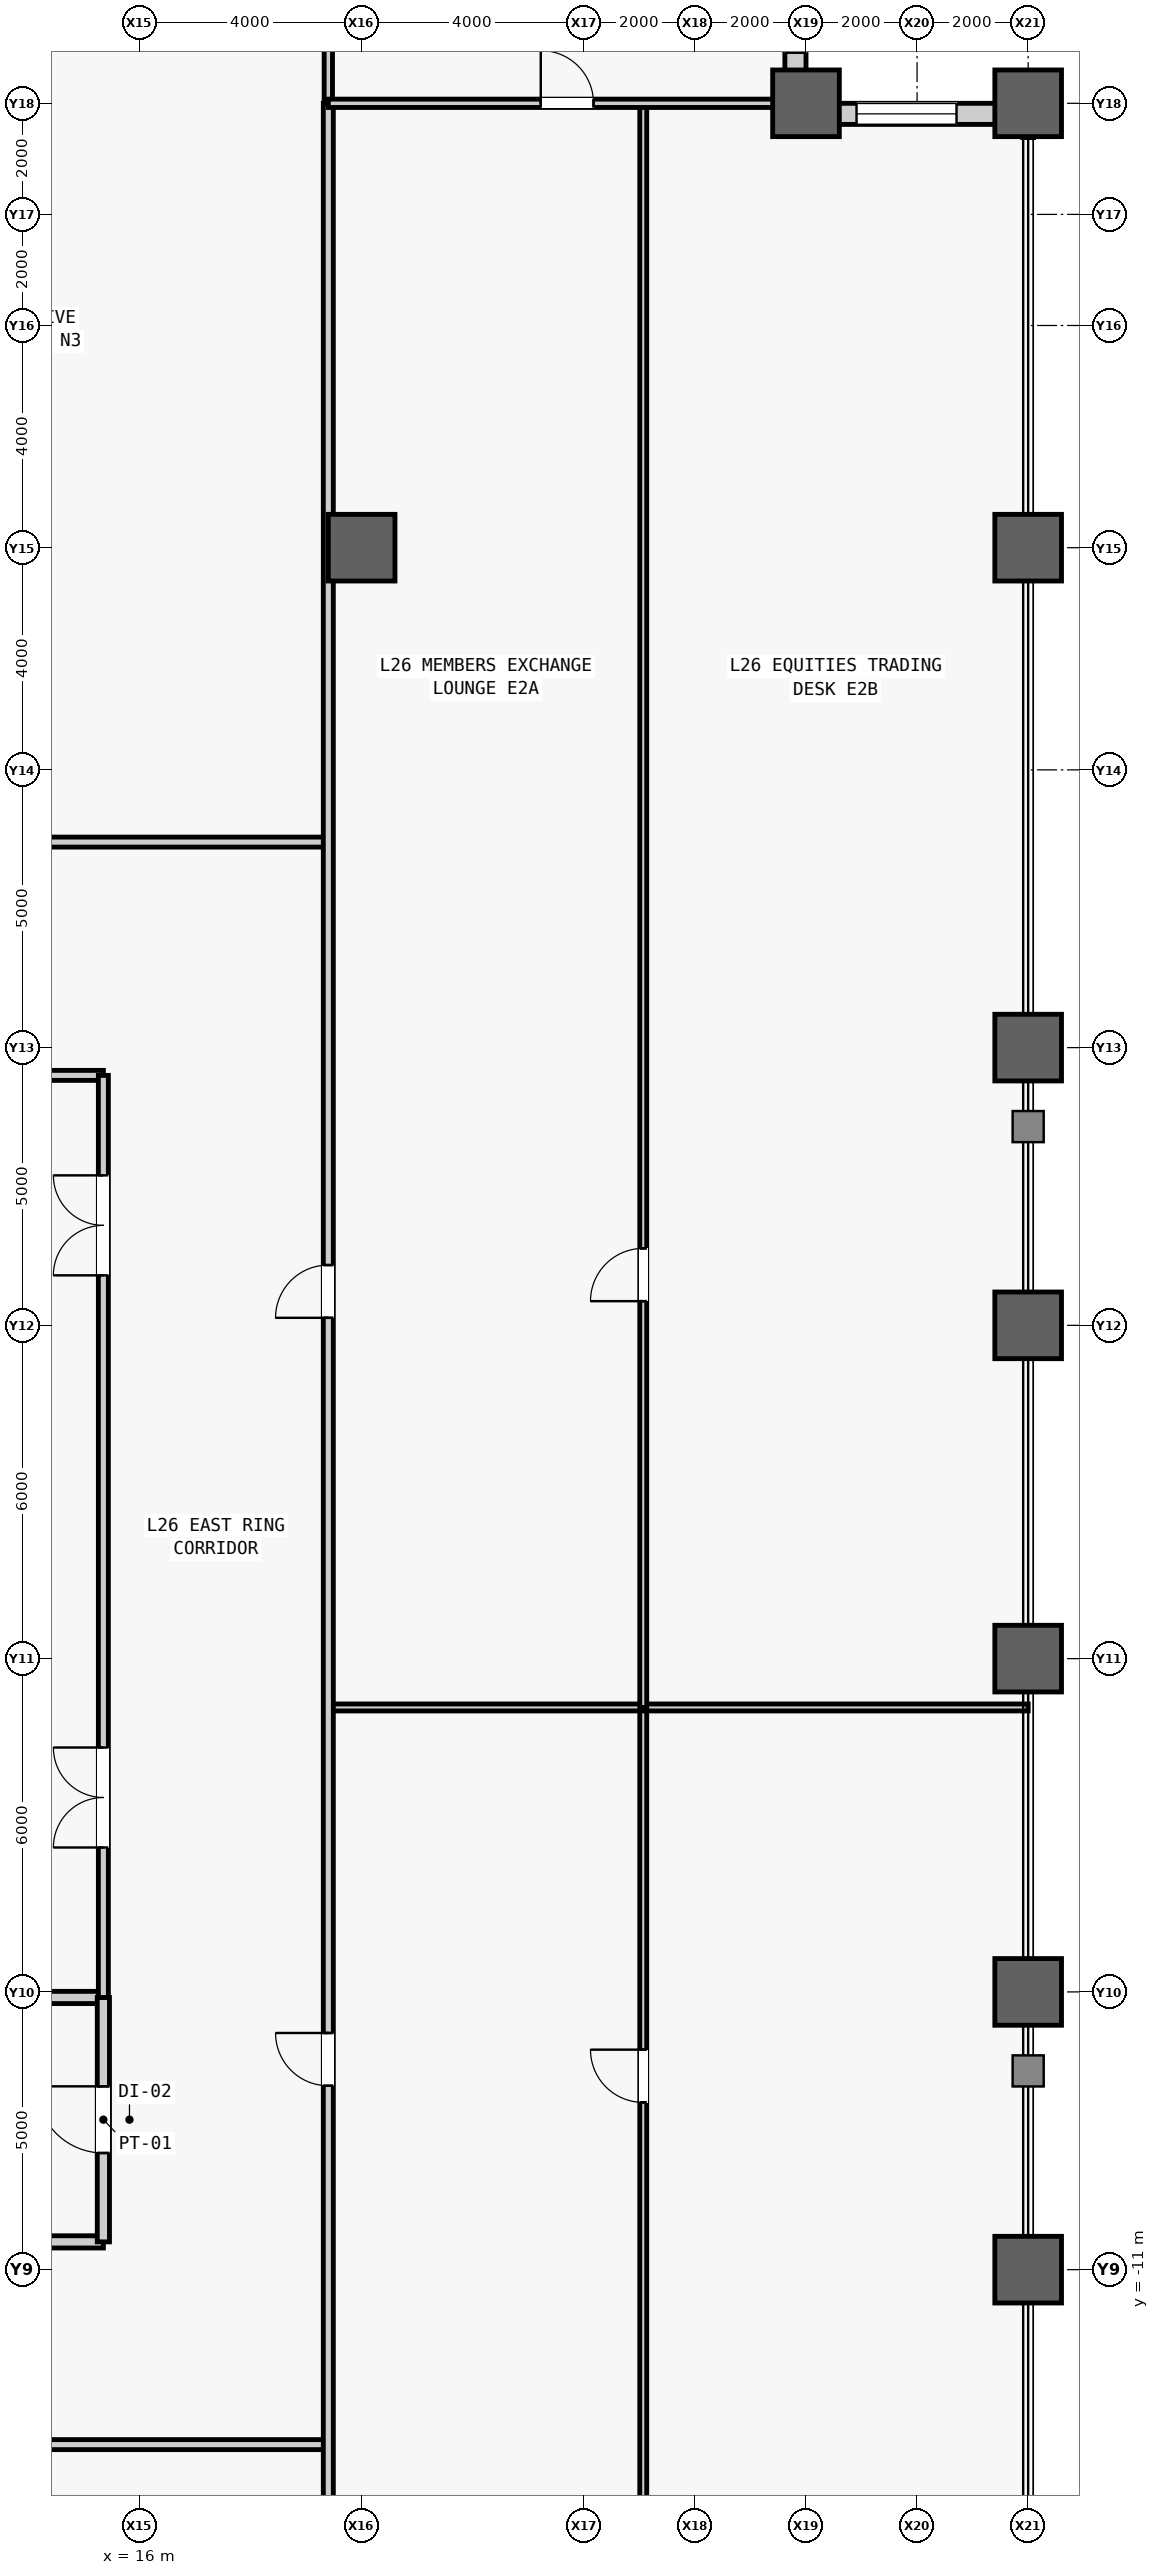
"""IFC4 building model, lengths in metres.
Left out: names, types, materials, properties, quantities, classifications, styles, units other than length and angle.
Written with IfcOpenShell. Run it as: python <this file> out.ifc"""

import sys

from ifc_helpers import new_model, si_unit, direction, frame, frame_2d, origin, origin_2d, place, context, subcontext, project, spatial, rectangle, hollow_rectangle, extrude, source, transform, mapped, element, fill, save


model = new_model("IFC4")
c1 = context("Model", 3, precision=1e-05, world=origin(), true_north=direction((0.0, 1.0)))
c2 = subcontext(c1, "Body", "Model", "MODEL_VIEW")
j1 = project(units=[si_unit("LENGTHUNIT", "METRE"), si_unit("PLANEANGLEUNIT", "RADIAN")], contexts=[c1])
p1 = place(None, origin())
s1 = spatial("IfcSite", under=j1, at=p1, CompositionType="ELEMENT")
p2 = place(p1, origin())
s2 = spatial("IfcBuilding", under=s1, at=p2, CompositionType="ELEMENT")
p3 = place(p2, frame((0.0, 0.0, 116.0)))
s3 = spatial("IfcBuildingStorey", under=s2, at=p3, CompositionType="ELEMENT", Elevation=116.0)
m1 = source(origin(), c2, "Body", "SweptSolid", [
    extrude(hollow_rectangle(XDim=1.2, YDim=1.2, WallThickness=0.07, at=origin_2d()), origin(), (0.0, 0.0, 1.0), 4.1),
])
for number, where, z_axis, x_axis in (
    (1, (20.0, 20.0, 0.0), (0.0, 0.0, 1.0), (1.0, 0.0, 0.0)),
    (2, (28.0, 28.0, 0.0), (0.0, 0.0, 1.0), (1.0, 0.0, 0.0)),
    (3, (32.0, -11.0, 0.0), (0.0, 0.0, 1.0), (1.0, 0.0, 0.0)),
    (4, (32.0, -6.0, 0.0), (0.0, 0.0, 1.0), (1.0, 0.0, 0.0)),
    (5, (32.0, 0.0, 0.0), (0.0, 0.0, 1.0), (1.0, 0.0, 0.0)),
    (6, (32.0, 6.0, 0.0), (0.0, 0.0, 1.0), (1.0, 0.0, 0.0)),
    (7, (32.0, 11.0, 0.0), (0.0, 0.0, 1.0), (1.0, 0.0, 0.0)),
    (8, (32.0, 20.0, 0.0), (0.0, 0.0, 1.0), (1.0, 0.0, 0.0)),
    (9, (32.0, 28.0, 0.0), (0.0, 0.0, 1.0), (1.0, 0.0, 0.0)),
):
    element("IfcColumn", number, at=place(p3, frame(where, z_axis=z_axis, x_axis=x_axis)), inside=s3, PredefinedType="COLUMN", context=c2, shape_type="MappedRepresentation", body=[
        mapped(m1, transform((0.0, 0.0, 0.0), scale=1.0)),
    ])
m2 = source(origin(), c2, "Body", "SweptSolid", [
    extrude(rectangle(XDim=3.62, YDim=0.38, at=frame_2d((1.81, 0.0))), origin(), (0.0, 0.0, 1.0), 3.145),
])
p4 = place(p3, frame((28.0, 27.81, 0.0), z_axis=(0.0, 0.0, 1.0), x_axis=(1.0, 0.0, 0.0)))
e10 = element("IfcWall", 10, at=p4, inside=s3, PredefinedType="STANDARD", context=c2, shape_type="MappedRepresentation", body=[
    mapped(m2, transform((0.0, 0.0, 0.0), scale=1.0)),
])
m3 = source(origin(), c2, "Body", "SweptSolid", [
    extrude(rectangle(XDim=1.8, YDim=2.4, at=frame_2d((0.9, 1.2))), frame((0.0, 0.2, 0.0), z_axis=(0.0, -1.0, 0.0), x_axis=(1.0, 0.0, 0.0)), (0.0, 0.0, 1.0), 0.4),
])
p5 = place(p4, frame((0.91, 0.0, 0.5)))
e11 = element("IfcOpeningElement", 11, at=p5, cuts=e10, PredefinedType="OPENING", context=c2, shape_type="MappedRepresentation", body=[
    mapped(m3, transform((0.0, 0.0, 0.0), scale=1.0)),
])
p6 = place(p3, frame((27.81, 28.0, 0.0), z_axis=(0.0, 0.0, 1.0), x_axis=(0.0, 1.0, 0.0)))
e12 = element("IfcWall", 12, at=p6, inside=s3, PredefinedType="STANDARD", context=c2, shape_type="MappedRepresentation", body=[
    mapped(m2, transform((0.0, 0.0, 0.0), scale=1.0)),
])
p7 = place(p6, frame((0.91, 0.0, 0.5)))
e13 = element("IfcOpeningElement", 13, at=p7, cuts=e12, PredefinedType="OPENING", context=c2, shape_type="MappedRepresentation", body=[
    mapped(m3, transform((0.0, 0.0, 0.0), scale=1.0)),
])
m4 = source(origin(), c2, "Body", "SweptSolid", [
    extrude(rectangle(XDim=4.05, YDim=0.22, at=frame_2d((2.025, 0.0))), origin(), (0.0, 0.0, 1.0), 3.84),
])
p8 = place(p3, frame((11.3, -10.5, 0.0), z_axis=(0.0, 0.0, 1.0), x_axis=(1.0, 0.0, 0.0)))
e14 = element("IfcWall", 14, at=p8, inside=s3, PredefinedType="PARTITIONING", context=c2, shape_type="MappedRepresentation", body=[
    mapped(m4, transform((0.0, 0.0, 0.0), scale=1.0)),
])
m5 = source(origin(), c2, "Body", "SweptSolid", [
    extrude(rectangle(XDim=4.05, YDim=0.22, at=frame_2d((2.025, 0.0))), origin(), (0.0, 0.0, 1.0), 3.067),
])
p9 = place(p3, frame((11.3, -6.1, 0.0), z_axis=(0.0, 0.0, 1.0), x_axis=(1.0, 0.0, 0.0)))
e15 = element("IfcWall", 15, at=p9, inside=s3, PredefinedType="PARTITIONING", context=c2, shape_type="MappedRepresentation", body=[
    mapped(m5, transform((0.0, 0.0, 0.0), scale=1.0)),
])
m6 = source(origin(), c2, "Body", "SweptSolid", [
    extrude(rectangle(XDim=4.4, YDim=0.22, at=frame_2d((2.2, 0.0))), origin(), (0.0, 0.0, 1.0), 3.84),
])
p10 = place(p3, frame((15.35, -10.5, 0.0), z_axis=(0.0, 0.0, 1.0), x_axis=(0.0, 1.0, 0.0)))
e16 = element("IfcWall", 16, at=p10, inside=s3, PredefinedType="PARTITIONING", context=c2, shape_type="MappedRepresentation", body=[
    mapped(m6, transform((0.0, 0.0, 0.0), scale=1.0)),
])
m7 = source(origin(), c2, "Body", "SweptSolid", [
    extrude(rectangle(XDim=1.2, YDim=2.2, at=frame_2d((0.6, 1.1))), frame((0.0, 0.12, 0.0), z_axis=(0.0, -1.0, 0.0), x_axis=(1.0, 0.0, 0.0)), (0.0, 0.0, 1.0), 0.24),
])
p11 = place(p10, frame((1.6, 0.0, 0.0)))
e17 = element("IfcOpeningElement", 17, at=p11, cuts=e16, PredefinedType="OPENING", context=c2, shape_type="MappedRepresentation", body=[
    mapped(m7, transform((0.0, 0.0, 0.0), scale=1.0)),
])
m8 = source(origin(), c2, "Body", "SweptSolid", [
    extrude(rectangle(XDim=4.05, YDim=0.18, at=frame_2d((2.025, 0.0))), origin(), (0.0, 0.0, 1.0), 3.84),
])
p12 = place(p3, frame((11.3, 10.5, 0.0), z_axis=(0.0, 0.0, 1.0), x_axis=(1.0, 0.0, 0.0)))
e18 = element("IfcWall", 18, at=p12, inside=s3, PredefinedType="PARTITIONING", context=c2, shape_type="MappedRepresentation", body=[
    mapped(m8, transform((0.0, 0.0, 0.0), scale=1.0)),
])
m9 = source(origin(), c2, "Body", "SweptSolid", [
    extrude(rectangle(XDim=16.6, YDim=0.18, at=frame_2d((8.3, 0.0))), origin(), (0.0, 0.0, 1.0), 3.84),
])
p13 = place(p3, frame((15.35, -6.1, 0.0), z_axis=(0.0, 0.0, 1.0), x_axis=(0.0, 1.0, 0.0)))
e19 = element("IfcWall", 19, at=p13, inside=s3, PredefinedType="PARTITIONING", context=c2, shape_type="MappedRepresentation", body=[
    mapped(m9, transform((0.0, 0.0, 0.0), scale=1.0)),
])
m10 = source(origin(), c2, "Body", "SweptSolid", [
    extrude(rectangle(XDim=1.8, YDim=2.25, at=frame_2d((0.9, 1.125))), frame((0.0, 0.1, 0.0), z_axis=(0.0, -1.0, 0.0), x_axis=(1.0, 0.0, 0.0)), (0.0, 0.0, 1.0), 0.2),
])
p14 = place(p13, frame((2.7, 0.0, 0.0)))
e20 = element("IfcOpeningElement", 20, at=p14, cuts=e19, PredefinedType="OPENING", context=c2, shape_type="MappedRepresentation", body=[
    mapped(m10, transform((0.0, 0.0, 0.0), scale=1.0)),
])
p15 = place(p13, frame((13.0, 0.0, 0.0)))
e21 = element("IfcOpeningElement", 21, at=p15, cuts=e19, PredefinedType="OPENING", context=c2, shape_type="MappedRepresentation", body=[
    mapped(m10, transform((0.0, 0.0, 0.0), scale=1.0)),
])
m11 = source(origin(), c2, "Body", "SweptSolid", [
    extrude(rectangle(XDim=37.95, YDim=0.18, at=frame_2d((18.975, 0.0))), origin(), (0.0, 0.0, 1.0), 3.84),
])
p16 = place(p3, frame((-18.55, -14.15, 0.0), z_axis=(0.0, 0.0, 1.0), x_axis=(1.0, 0.0, 0.0)))
e22 = element("IfcWall", 22, at=p16, inside=s3, PredefinedType="PARTITIONING", context=c2, shape_type="MappedRepresentation", body=[
    mapped(m11, transform((0.0, 0.0, 0.0), scale=1.0)),
])
m12 = source(origin(), c2, "Body", "SweptSolid", [
    extrude(rectangle(XDim=1.05, YDim=2.2, at=frame_2d((0.525, 1.1))), frame((0.0, 0.1, 0.0), z_axis=(0.0, -1.0, 0.0), x_axis=(1.0, 0.0, 0.0)), (0.0, 0.0, 1.0), 0.2),
])
p17 = place(p16, frame((18.025, 0.0, 0.0)))
e23 = element("IfcOpeningElement", 23, at=p17, cuts=e22, PredefinedType="OPENING", context=c2, shape_type="MappedRepresentation", body=[
    mapped(m12, transform((0.0, 0.0, 0.0), scale=1.0)),
])
p18 = place(p3, frame((-18.55, 14.7, 0.0), z_axis=(0.0, 0.0, 1.0), x_axis=(1.0, 0.0, 0.0)))
e24 = element("IfcWall", 24, at=p18, inside=s3, PredefinedType="PARTITIONING", context=c2, shape_type="MappedRepresentation", body=[
    mapped(m11, transform((0.0, 0.0, 0.0), scale=1.0)),
])
p19 = place(p18, frame((8.001, 0.0, 0.0)))
e25 = element("IfcOpeningElement", 25, at=p19, cuts=e24, PredefinedType="OPENING", context=c2, shape_type="MappedRepresentation", body=[
    mapped(m12, transform((0.0, 0.0, 0.0), scale=1.0)),
])
p20 = place(p18, frame((18.83, 0.0, 0.0)))
e26 = element("IfcOpeningElement", 26, at=p20, cuts=e24, PredefinedType="OPENING", context=c2, shape_type="MappedRepresentation", body=[
    mapped(m12, transform((0.0, 0.0, 0.0), scale=1.0)),
])
p21 = place(p18, frame((28.853, 0.0, 0.0)))
e27 = element("IfcOpeningElement", 27, at=p21, cuts=e24, PredefinedType="OPENING", context=c2, shape_type="MappedRepresentation", body=[
    mapped(m12, transform((0.0, 0.0, 0.0), scale=1.0)),
])
m13 = source(origin(), c2, "Body", "SweptSolid", [
    extrude(rectangle(XDim=4.0, YDim=0.15, at=frame_2d((2.0, 0.0))), origin(), (0.0, 0.0, 1.0), 3.84),
])
p22 = place(p3, frame((19.4, 28.0, 0.0), z_axis=(0.0, 0.0, 1.0), x_axis=(0.0, 1.0, 0.0)))
e28 = element("IfcWall", 28, at=p22, inside=s3, PredefinedType="PARTITIONING", context=c2, shape_type="MappedRepresentation", body=[
    mapped(m13, transform((0.0, 0.0, 0.0), scale=1.0)),
])
m14 = source(origin(), c2, "Body", "SweptSolid", [
    extrude(rectangle(XDim=27.121, YDim=0.125, at=frame_2d((13.561, 0.0))), origin(), (0.0, 0.0, 1.0), 3.84),
])
p23 = place(p3, frame((25.07, -28.0, 0.0), z_axis=(0.0, 0.0, 1.0), x_axis=(0.0, 1.0, 0.0)))
e29 = element("IfcWall", 29, at=p23, inside=s3, PredefinedType="PARTITIONING", context=c2, shape_type="MappedRepresentation", body=[
    mapped(m14, transform((0.0, 0.0, 0.0), scale=1.0)),
])
m15 = source(origin(), c2, "Body", "SweptSolid", [
    extrude(rectangle(XDim=0.95, YDim=2.15, at=frame_2d((0.475, 1.075))), frame((0.0, 0.073, 0.0), z_axis=(0.0, -1.0, 0.0), x_axis=(1.0, 0.0, 0.0)), (0.0, 0.0, 1.0), 0.145),
])
p24 = place(p23, frame((20.01, 0.0, 0.0)))
e30 = element("IfcOpeningElement", 30, at=p24, cuts=e29, PredefinedType="OPENING", context=c2, shape_type="MappedRepresentation", body=[
    mapped(m15, transform((0.0, 0.0, 0.0), scale=1.0)),
])
m16 = source(origin(), c2, "Body", "SweptSolid", [
    extrude(rectangle(XDim=12.6, YDim=0.125, at=frame_2d((6.3, 0.0))), origin(), (0.0, 0.0, 1.0), 3.84),
])
p25 = place(p3, frame((19.4, -0.879, 0.0), z_axis=(0.0, 0.0, 1.0), x_axis=(1.0, 0.0, 0.0)))
e31 = element("IfcWall", 31, at=p25, inside=s3, PredefinedType="PARTITIONING", context=c2, shape_type="MappedRepresentation", body=[
    mapped(m16, transform((0.0, 0.0, 0.0), scale=1.0)),
])
m17 = source(origin(), c2, "Body", "SweptSolid", [
    extrude(rectangle(XDim=28.879, YDim=0.125, at=frame_2d((14.439, 0.0))), origin(), (0.0, 0.0, 1.0), 3.84),
])
p26 = place(p3, frame((25.07, -0.879, 0.0), z_axis=(0.0, 0.0, 1.0), x_axis=(0.0, 1.0, 0.0)))
e32 = element("IfcWall", 32, at=p26, inside=s3, PredefinedType="PARTITIONING", context=c2, shape_type="MappedRepresentation", body=[
    mapped(m17, transform((0.0, 0.0, 0.0), scale=1.0)),
])
p27 = place(p26, frame((7.314, 0.0, 0.0)))
e33 = element("IfcOpeningElement", 33, at=p27, cuts=e32, PredefinedType="OPENING", context=c2, shape_type="MappedRepresentation", body=[
    mapped(m15, transform((0.0, 0.0, 0.0), scale=1.0)),
])
m18 = source(origin(), c2, "Body", "SweptSolid", [
    extrude(rectangle(XDim=56.0, YDim=0.18, at=frame_2d((28.0, 0.0))), origin(), (0.0, 0.0, 1.0), 3.371),
])
p28 = place(p3, frame((19.4, -28.0, 0.0), z_axis=(0.0, 0.0, 1.0), x_axis=(0.0, 1.0, 0.0)))
e34 = element("IfcWall", 34, at=p28, inside=s3, PredefinedType="PARTITIONING", context=c2, shape_type="MappedRepresentation", body=[
    mapped(m18, transform((0.0, 0.0, 0.0), scale=1.0)),
])
m19 = source(origin(), c2, "Body", "SweptSolid", [
    extrude(rectangle(XDim=0.95, YDim=2.15, at=frame_2d((0.475, 1.075))), frame((0.0, 0.1, 0.0), z_axis=(0.0, -1.0, 0.0), x_axis=(1.0, 0.0, 0.0)), (0.0, 0.0, 1.0), 0.2),
])
p29 = place(p28, frame((20.311, 0.0, 0.0)))
e35 = element("IfcOpeningElement", 35, at=p29, cuts=e34, PredefinedType="OPENING", context=c2, shape_type="MappedRepresentation", body=[
    mapped(m19, transform((0.0, 0.0, 0.0), scale=1.0)),
])
p30 = place(p28, frame((34.135, 0.0, 0.0)))
e36 = element("IfcOpeningElement", 36, at=p30, cuts=e34, PredefinedType="OPENING", context=c2, shape_type="MappedRepresentation", body=[
    mapped(m19, transform((0.0, 0.0, 0.0), scale=1.0)),
])
m20 = source(origin(), c2, "Body", "SweptSolid", [
    extrude(rectangle(XDim=8.6, YDim=0.15, at=frame_2d((4.3, 0.0))), origin(), (0.0, 0.0, 1.0), 3.84),
])
p31 = place(p3, frame((19.4, 28.0, 0.0), z_axis=(0.0, 0.0, 1.0), x_axis=(1.0, 0.0, 0.0)))
e37 = element("IfcWall", 37, at=p31, inside=s3, PredefinedType="PARTITIONING", context=c2, shape_type="MappedRepresentation", body=[
    mapped(m20, transform((0.0, 0.0, 0.0), scale=1.0)),
])
m21 = source(origin(), c2, "Body", "SweptSolid", [
    extrude(rectangle(XDim=0.95, YDim=2.15, at=frame_2d((0.475, 1.075))), frame((0.0, 0.085, 0.0), z_axis=(0.0, -1.0, 0.0), x_axis=(1.0, 0.0, 0.0)), (0.0, 0.0, 1.0), 0.17),
])
p32 = place(p31, frame((3.825, 0.0, 0.0)))
e38 = element("IfcOpeningElement", 38, at=p32, cuts=e37, PredefinedType="OPENING", context=c2, shape_type="MappedRepresentation", body=[
    mapped(m21, transform((0.0, 0.0, 0.0), scale=1.0)),
])
m22 = source(origin(), c2, "Body", "SweptSolid", [
    extrude(rectangle(XDim=1.8, YDim=2.4, at=frame_2d((0.9, 1.2))), frame((0.0, 0.03, 0.0), z_axis=(0.0, -1.0, 0.0), x_axis=(1.0, 0.0, 0.0)), (0.0, 0.0, 1.0), 0.06),
])
p33 = place(p5, origin())
e39 = element("IfcWindow", 39, at=p33, inside=s3, PartitioningType="SINGLE_PANEL", PredefinedType="WINDOW", context=c2, shape_type="MappedRepresentation", body=[
    mapped(m22, transform((0.0, 0.0, 0.0), scale=1.0)),
])
fill(e11, e39)
p34 = place(p7, origin())
e40 = element("IfcWindow", 40, at=p34, inside=s3, PartitioningType="SINGLE_PANEL", PredefinedType="WINDOW", context=c2, shape_type="MappedRepresentation", body=[
    mapped(m22, transform((0.0, 0.0, 0.0), scale=1.0)),
])
fill(e13, e40)
m23 = source(origin(), c2, "Body", "SweptSolid", [
    extrude(rectangle(XDim=1.2, YDim=2.2, at=frame_2d((0.6, 1.1))), frame((0.0, 0.025, 0.0), z_axis=(0.0, -1.0, 0.0), x_axis=(1.0, 0.0, 0.0)), (0.0, 0.0, 1.0), 0.05),
])
p35 = place(p11, origin())
e41 = element("IfcDoor", 41, at=p35, inside=s3, OperationType="SINGLE_SWING_RIGHT", PredefinedType="DOOR", context=c2, shape_type="MappedRepresentation", body=[
    mapped(m23, transform((0.0, 0.0, 0.0), scale=1.0)),
])
fill(e17, e41)
m24 = source(origin(), c2, "Body", "SweptSolid", [
    extrude(rectangle(XDim=1.8, YDim=2.25, at=frame_2d((0.9, 1.125))), frame((0.0, 0.025, 0.0), z_axis=(0.0, -1.0, 0.0), x_axis=(1.0, 0.0, 0.0)), (0.0, 0.0, 1.0), 0.05),
])
p36 = place(p14, origin())
e42 = element("IfcDoor", 42, at=p36, inside=s3, OperationType="SINGLE_SWING_RIGHT", PredefinedType="DOOR", context=c2, shape_type="MappedRepresentation", body=[
    mapped(m24, transform((0.0, 0.0, 0.0), scale=1.0)),
])
fill(e20, e42)
p37 = place(p15, origin())
e43 = element("IfcDoor", 43, at=p37, inside=s3, OperationType="SINGLE_SWING_LEFT", PredefinedType="DOOR", context=c2, shape_type="MappedRepresentation", body=[
    mapped(m24, transform((0.0, 0.0, 0.0), scale=1.0)),
])
fill(e21, e43)
m25 = source(origin(), c2, "Body", "SweptSolid", [
    extrude(rectangle(XDim=0.95, YDim=2.15, at=frame_2d((0.475, 1.075))), frame((0.0, 0.025, 0.0), z_axis=(0.0, -1.0, 0.0), x_axis=(1.0, 0.0, 0.0)), (0.0, 0.0, 1.0), 0.05),
])
p38 = place(p24, origin())
e44 = element("IfcDoor", 44, at=p38, inside=s3, OperationType="SINGLE_SWING_RIGHT", PredefinedType="DOOR", context=c2, shape_type="MappedRepresentation", body=[
    mapped(m25, transform((0.0, 0.0, 0.0), scale=1.0)),
])
fill(e30, e44)
p39 = place(p27, origin())
e45 = element("IfcDoor", 45, at=p39, inside=s3, OperationType="SINGLE_SWING_LEFT", PredefinedType="DOOR", context=c2, shape_type="MappedRepresentation", body=[
    mapped(m25, transform((0.0, 0.0, 0.0), scale=1.0)),
])
fill(e33, e45)
p40 = place(p29, origin())
e46 = element("IfcDoor", 46, at=p40, inside=s3, OperationType="SINGLE_SWING_RIGHT", PredefinedType="DOOR", context=c2, shape_type="MappedRepresentation", body=[
    mapped(m25, transform((0.0, 0.0, 0.0), scale=1.0)),
])
fill(e35, e46)
p41 = place(p30, origin())
e47 = element("IfcDoor", 47, at=p41, inside=s3, OperationType="SINGLE_SWING_LEFT", PredefinedType="DOOR", context=c2, shape_type="MappedRepresentation", body=[
    mapped(m25, transform((0.0, 0.0, 0.0), scale=1.0)),
])
fill(e36, e47)
p42 = place(p32, origin())
e48 = element("IfcDoor", 48, at=p42, inside=s3, OperationType="SINGLE_SWING_LEFT", PredefinedType="DOOR", context=c2, shape_type="MappedRepresentation", body=[
    mapped(m25, transform((0.0, 0.0, 0.0), scale=1.0)),
])
fill(e38, e48)
save(model, sys.argv[1])
